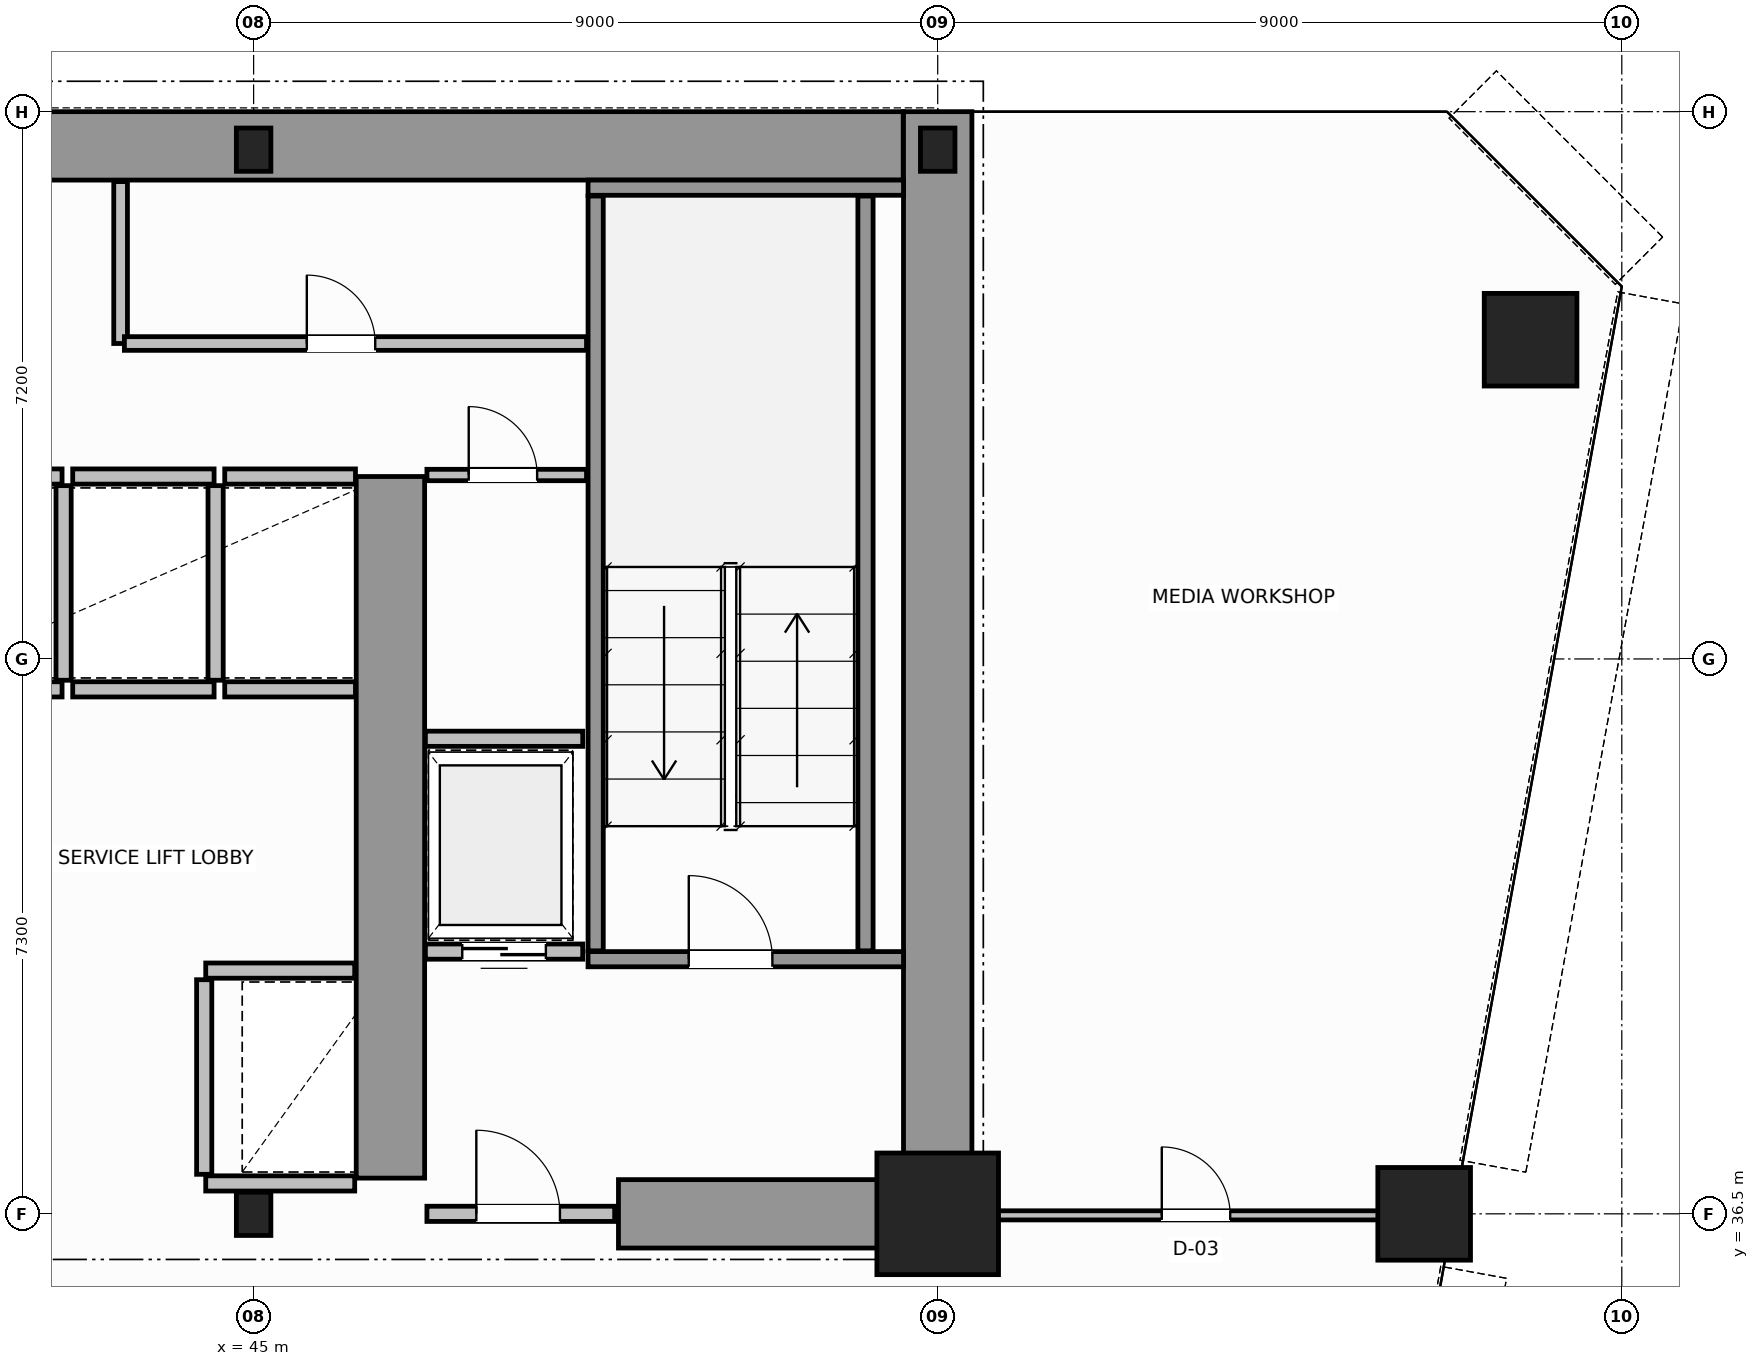
"""IFC4 building model, lengths in metres.
Left out: names, types, materials, properties, quantities, classifications, styles, units other than length and angle.
Written with IfcOpenShell. Run it as: python <this file> out.ifc"""

import sys

from ifc_helpers import new_model, si_unit, direction, frame, frame_2d, origin, origin_2d, place, context, subcontext, project, spatial, rectangle, hollow_circle, i_section, extrude, source, transform, mapped, element, fill, save


model = new_model("IFC4")
c1 = context("Model", 3, precision=1e-05, world=origin(), true_north=direction((0.0, 1.0)))
c2 = subcontext(c1, "Body", "Model", "MODEL_VIEW")
j1 = project(units=[si_unit("LENGTHUNIT", "METRE"), si_unit("PLANEANGLEUNIT", "RADIAN")], contexts=[c1])
p1 = place(None, origin())
s1 = spatial("IfcSite", under=j1, at=p1, CompositionType="ELEMENT")
p2 = place(p1, origin())
s2 = spatial("IfcBuilding", under=s1, at=p2, CompositionType="ELEMENT")
p3 = place(p2, frame((0.0, 0.0, 30.2)))
s3 = spatial("IfcBuildingStorey", under=s2, at=p3, CompositionType="ELEMENT", Elevation=30.2)
m1 = source(origin(), c2, "Body", "SweptSolid", [
    extrude(i_section(OverallWidth=0.454, OverallDepth=0.569, WebThickness=0.078, FlangeThickness=0.08, FilletRadius=0.015, at=origin_2d()), origin(), (0.0, 0.0, 1.0), 3.8),
])
p4 = place(p3, frame((45.0, 36.5, 0.0), z_axis=(0.0, 0.0, 1.0), x_axis=(1.0, 0.0, 0.0)))
e1 = element("IfcColumn", 1, at=p4, inside=s3, PredefinedType="COLUMN", context=c2, shape_type="MappedRepresentation", body=[
    mapped(m1, transform((0.0, 0.0, 0.0), scale=1.0)),
])
m2 = source(origin(), c2, "Body", "SweptSolid", [
    extrude(rectangle(XDim=1.6, YDim=1.6, at=origin_2d()), origin(), (0.0, 0.0, 1.0), 3.8),
])
p5 = place(p3, frame((54.0, 36.5, 0.0), z_axis=(0.0, 0.0, 1.0), x_axis=(1.0, 0.0, 0.0)))
e2 = element("IfcColumn", 2, at=p5, inside=s3, PredefinedType="COLUMN", context=c2, shape_type="MappedRepresentation", body=[
    mapped(m2, transform((0.0, 0.0, 0.0), scale=1.0)),
])
for number, where, z_axis, x_axis in (
    (3, (45.0, 50.5, 0.0), (0.0, 0.0, 1.0), (1.0, 0.0, 0.0)),
    (4, (54.0, 50.5, 0.0), (0.0, 0.0, 1.0), (1.0, 0.0, 0.0)),
):
    element("IfcColumn", number, at=place(p3, frame(where, z_axis=z_axis, x_axis=x_axis)), inside=s3, PredefinedType="COLUMN", context=c2, shape_type="MappedRepresentation", body=[
        mapped(m1, transform((0.0, 0.0, 0.0), scale=1.0)),
    ])
m3 = source(origin(), c2, "Body", "SweptSolid", [
    extrude(hollow_circle(Radius=0.61, WallThickness=0.05, at=origin_2d()), origin(), (0.0, 0.0, 1.0), 3.8),
])
for number, where, z_axis, x_axis in (
    (5, (61.8, 48.0, 0.0), (0.0, 0.0, 1.0), (1.0, 0.0, 0.0)),
    (6, (60.4, 36.5, 0.0), (0.0, 0.0, 1.0), (1.0, 0.0, 0.0)),
):
    element("IfcColumn", number, at=place(p3, frame(where, z_axis=z_axis, x_axis=x_axis)), inside=s3, PredefinedType="COLUMN", context=c2, shape_type="MappedRepresentation", body=[
        mapped(m3, transform((0.0, 0.0, 0.0), scale=1.0)),
    ])
p6 = place(p3, frame((34.002, 50.55, 0.0), z_axis=(0.0, 0.0, 1.0), x_axis=(1.0, 0.0, 0.0)))
e7 = element("IfcWall", 7, at=p6, inside=s3, PredefinedType="SHEAR", context=c2, shape_type="SweptSolid", body=[
    extrude(rectangle(XDim=19.544, YDim=0.9, at=frame_2d((9.772, 0.0))), origin(), (0.0, 0.0, 1.0), 3.8),
])
p7 = place(p3, frame((54.0, 36.5, 0.0), z_axis=(0.0, 0.0, 1.0), x_axis=(0.0, 1.0, 0.0)))
e8 = element("IfcWall", 8, at=p7, inside=s3, PredefinedType="SHEAR", context=c2, shape_type="SweptSolid", body=[
    extrude(rectangle(XDim=14.5, YDim=0.9, at=frame_2d((7.25, 0.0))), origin(), (0.0, 0.0, 1.0), 3.8),
])
p8 = place(p3, frame((49.8, 36.5, 0.0), z_axis=(0.0, 0.0, 1.0), x_axis=(1.0, 0.0, 0.0)))
e9 = element("IfcWall", 9, at=p8, inside=s3, PredefinedType="SHEAR", context=c2, shape_type="SweptSolid", body=[
    extrude(rectangle(XDim=3.73, YDim=0.9, at=frame_2d((1.865, 0.0))), origin(), (0.0, 0.0, 1.0), 2.38),
])
p9 = place(p3, frame((46.8, 36.97, 0.0), z_axis=(0.0, 0.0, 1.0), x_axis=(0.0, 1.0, 0.0)))
e10 = element("IfcWall", 10, at=p9, inside=s3, PredefinedType="SHEAR", context=c2, shape_type="SweptSolid", body=[
    extrude(rectangle(XDim=9.23, YDim=0.9, at=frame_2d((4.615, 0.0))), origin(), (0.0, 0.0, 1.0), 3.8),
])
p10 = place(p3, frame((49.4, 39.85, 0.0), z_axis=(0.0, 0.0, 1.0), x_axis=(1.0, 0.0, 0.0)))
e11 = element("IfcWall", 11, at=p10, inside=s3, PredefinedType="SOLIDWALL", context=c2, shape_type="SweptSolid", body=[
    extrude(rectangle(XDim=4.15, YDim=0.2, at=frame_2d((2.075, 0.0))), origin(), (0.0, 0.0, 1.0), 3.8),
])
p11 = place(p10, frame((1.325, 0.0, 0.0)))
e12 = element("IfcOpeningElement", 12, at=p11, cuts=e11, PredefinedType="OPENING", context=c2, shape_type="SweptSolid", body=[
    extrude(rectangle(XDim=1.1, YDim=2.15, at=frame_2d((0.55, 1.075))), frame((0.0, 0.11, 0.0), z_axis=(0.0, -1.0, 0.0), x_axis=(1.0, 0.0, 0.0)), (0.0, 0.0, 1.0), 0.22),
])
p12 = place(p3, frame((49.4, 50.0, 0.0), z_axis=(0.0, 0.0, 1.0), x_axis=(1.0, 0.0, 0.0)))
e13 = element("IfcWall", 13, at=p12, inside=s3, PredefinedType="SOLIDWALL", context=c2, shape_type="SweptSolid", body=[
    extrude(rectangle(XDim=4.15, YDim=0.2, at=frame_2d((2.075, 0.0))), origin(), (0.0, 0.0, 1.0), 3.8),
])
for number, where, z_axis, x_axis in (
    (14, (49.5, 39.96, 0.0), (0.0, 0.0, 1.0), (0.0, 1.0, 0.0)),
    (15, (53.05, 39.96, 0.0), (0.0, 0.0, 1.0), (0.0, 1.0, 0.0)),
):
    element("IfcWall", number, at=place(p3, frame(where, z_axis=z_axis, x_axis=x_axis)), inside=s3, PredefinedType="SOLIDWALL", context=c2, shape_type="SweptSolid", body=[
        extrude(rectangle(XDim=9.93, YDim=0.2, at=frame_2d((4.965, 0.0))), origin(), (0.0, 0.0, 1.0), 3.8),
    ])
p13 = place(p3, frame((47.28, 36.5, 0.0), z_axis=(0.0, 0.0, 1.0), x_axis=(1.0, 0.0, 0.0)))
e16 = element("IfcWall", 16, at=p13, inside=s3, PredefinedType="SOLIDWALL", context=c2, shape_type="SweptSolid", body=[
    extrude(rectangle(XDim=2.47, YDim=0.2, at=frame_2d((1.235, 0.0))), origin(), (0.0, 0.0, 1.0), 2.37),
])
p14 = place(p13, frame((0.65, 0.0, 0.0)))
e17 = element("IfcOpeningElement", 17, at=p14, cuts=e16, PredefinedType="OPENING", context=c2, shape_type="SweptSolid", body=[
    extrude(rectangle(XDim=1.1, YDim=2.15, at=frame_2d((0.55, 1.075))), frame((0.0, 0.11, 0.0), z_axis=(0.0, -1.0, 0.0), x_axis=(1.0, 0.0, 0.0)), (0.0, 0.0, 1.0), 0.22),
])
p15 = place(p3, frame((44.37, 39.7, 0.0), z_axis=(0.0, 0.0, 1.0), x_axis=(1.0, 0.0, 0.0)))
e18 = element("IfcWall", 18, at=p15, inside=s3, PredefinedType="SOLIDWALL", context=c2, shape_type="SweptSolid", body=[
    extrude(rectangle(XDim=1.96, YDim=0.2, at=frame_2d((0.98, 0.0))), origin(), (0.0, 0.0, 1.0), 3.58),
])
p16 = place(p3, frame((44.37, 36.9, 0.0), z_axis=(0.0, 0.0, 1.0), x_axis=(1.0, 0.0, 0.0)))
e19 = element("IfcWall", 19, at=p16, inside=s3, PredefinedType="SOLIDWALL", context=c2, shape_type="SweptSolid", body=[
    extrude(rectangle(XDim=1.96, YDim=0.2, at=frame_2d((0.98, 0.0))), origin(), (0.0, 0.0, 1.0), 2.37),
])
p17 = place(p3, frame((44.35, 37.02, 0.0), z_axis=(0.0, 0.0, 1.0), x_axis=(0.0, 1.0, 0.0)))
e20 = element("IfcWall", 20, at=p17, inside=s3, PredefinedType="SOLIDWALL", context=c2, shape_type="SweptSolid", body=[
    extrude(rectangle(XDim=2.56, YDim=0.2, at=frame_2d((1.28, 0.0))), origin(), (0.0, 0.0, 1.0), 3.58),
])
for number, where, z_axis, x_axis in (
    (21, (40.62, 43.4, 0.0), (0.0, 0.0, 1.0), (1.0, 0.0, 0.0)),
    (22, (40.62, 46.2, 0.0), (0.0, 0.0, 1.0), (1.0, 0.0, 0.0)),
):
    element("IfcWall", number, at=place(p3, frame(where, z_axis=z_axis, x_axis=x_axis)), inside=s3, PredefinedType="SOLIDWALL", context=c2, shape_type="SweptSolid", body=[
        extrude(rectangle(XDim=1.86, YDim=0.2, at=frame_2d((0.93, 0.0))), origin(), (0.0, 0.0, 1.0), 3.58),
    ])
p18 = place(p3, frame((42.5, 43.52, 0.0), z_axis=(0.0, 0.0, 1.0), x_axis=(0.0, 1.0, 0.0)))
e23 = element("IfcWall", 23, at=p18, inside=s3, PredefinedType="SOLIDWALL", context=c2, shape_type="SweptSolid", body=[
    extrude(rectangle(XDim=2.56, YDim=0.2, at=frame_2d((1.28, 0.0))), origin(), (0.0, 0.0, 1.0), 3.58),
])
for number, where, z_axis, x_axis in (
    (24, (42.62, 43.4, 0.0), (0.0, 0.0, 1.0), (1.0, 0.0, 0.0)),
    (25, (42.62, 46.2, 0.0), (0.0, 0.0, 1.0), (1.0, 0.0, 0.0)),
):
    element("IfcWall", number, at=place(p3, frame(where, z_axis=z_axis, x_axis=x_axis)), inside=s3, PredefinedType="SOLIDWALL", context=c2, shape_type="SweptSolid", body=[
        extrude(rectangle(XDim=1.86, YDim=0.2, at=frame_2d((0.93, 0.0))), origin(), (0.0, 0.0, 1.0), 3.58),
    ])
p19 = place(p3, frame((44.5, 43.52, 0.0), z_axis=(0.0, 0.0, 1.0), x_axis=(0.0, 1.0, 0.0)))
e26 = element("IfcWall", 26, at=p19, inside=s3, PredefinedType="SOLIDWALL", context=c2, shape_type="SweptSolid", body=[
    extrude(rectangle(XDim=2.56, YDim=0.2, at=frame_2d((1.28, 0.0))), origin(), (0.0, 0.0, 1.0), 3.58),
])
for number, where, z_axis, x_axis in (
    (27, (44.62, 43.4, 0.0), (0.0, 0.0, 1.0), (1.0, 0.0, 0.0)),
    (28, (44.62, 46.2, 0.0), (0.0, 0.0, 1.0), (1.0, 0.0, 0.0)),
):
    element("IfcWall", number, at=place(p3, frame(where, z_axis=z_axis, x_axis=x_axis)), inside=s3, PredefinedType="SOLIDWALL", context=c2, shape_type="SweptSolid", body=[
        extrude(rectangle(XDim=1.72, YDim=0.2, at=frame_2d((0.86, 0.0))), origin(), (0.0, 0.0, 1.0), 3.58),
    ])
p20 = place(p3, frame((47.26, 39.95, 0.0), z_axis=(0.0, 0.0, 1.0), x_axis=(1.0, 0.0, 0.0)))
e29 = element("IfcWall", 29, at=p20, inside=s3, PredefinedType="SOLIDWALL", context=c2, shape_type="SweptSolid", body=[
    extrude(rectangle(XDim=2.07, YDim=0.2, at=frame_2d((1.035, 0.0))), origin(), (0.0, 0.0, 1.0), 3.58),
])
p21 = place(p20, frame((0.485, 0.0, 0.0)))
e30 = element("IfcOpeningElement", 30, at=p21, cuts=e29, PredefinedType="OPENING", context=c2, shape_type="SweptSolid", body=[
    extrude(rectangle(XDim=1.1, YDim=2.15, at=frame_2d((0.55, 1.075))), frame((0.0, 0.11, 0.0), z_axis=(0.0, -1.0, 0.0), x_axis=(1.0, 0.0, 0.0)), (0.0, 0.0, 1.0), 0.22),
])
p22 = place(p3, frame((47.26, 42.75, 0.0), z_axis=(0.0, 0.0, 1.0), x_axis=(1.0, 0.0, 0.0)))
e31 = element("IfcWall", 31, at=p22, inside=s3, PredefinedType="SOLIDWALL", context=c2, shape_type="SweptSolid", body=[
    extrude(rectangle(XDim=2.07, YDim=0.2, at=frame_2d((1.035, 0.0))), origin(), (0.0, 0.0, 1.0), 3.58),
])
p23 = place(p3, frame((47.28, 46.22, 0.0), z_axis=(0.0, 0.0, 1.0), x_axis=(1.0, 0.0, 0.0)))
e32 = element("IfcWall", 32, at=p23, inside=s3, PredefinedType="PARTITIONING", context=c2, shape_type="SweptSolid", body=[
    extrude(rectangle(XDim=2.1, YDim=0.15, at=frame_2d((1.05, 0.0))), origin(), (0.0, 0.0, 1.0), 3.58),
])
p24 = place(p23, frame((0.55, 0.0, 0.0)))
e33 = element("IfcOpeningElement", 33, at=p24, cuts=e32, PredefinedType="OPENING", context=c2, shape_type="SweptSolid", body=[
    extrude(rectangle(XDim=0.9, YDim=2.1, at=frame_2d((0.45, 1.05))), frame((0.0, 0.085, 0.0), z_axis=(0.0, -1.0, 0.0), x_axis=(1.0, 0.0, 0.0)), (0.0, 0.0, 1.0), 0.17),
])
p25 = place(p3, frame((43.25, 47.95, 0.0), z_axis=(0.0, 0.0, 1.0), x_axis=(0.0, 1.0, 0.0)))
e34 = element("IfcWall", 34, at=p25, inside=s3, PredefinedType="PLUMBINGWALL", context=c2, shape_type="SweptSolid", body=[
    extrude(rectangle(XDim=2.13, YDim=0.18, at=frame_2d((1.065, 0.0))), origin(), (0.0, 0.0, 1.0), 3.58),
])
p26 = place(p3, frame((43.3, 47.95, 0.0), z_axis=(0.0, 0.0, 1.0), x_axis=(1.0, 0.0, 0.0)))
e35 = element("IfcWall", 35, at=p26, inside=s3, PredefinedType="PLUMBINGWALL", context=c2, shape_type="SweptSolid", body=[
    extrude(rectangle(XDim=6.08, YDim=0.18, at=frame_2d((3.04, 0.0))), origin(), (0.0, 0.0, 1.0), 3.58),
])
p27 = place(p26, frame((2.4, 0.0, 0.0)))
e36 = element("IfcOpeningElement", 36, at=p27, cuts=e35, PredefinedType="OPENING", context=c2, shape_type="SweptSolid", body=[
    extrude(rectangle(XDim=0.9, YDim=2.15, at=frame_2d((0.45, 1.075))), frame((0.0, 0.1, 0.0), z_axis=(0.0, -1.0, 0.0), x_axis=(1.0, 0.0, 0.0)), (0.0, 0.0, 1.0), 0.2),
])
p28 = place(p3, frame((54.06, 36.48, 0.0), z_axis=(0.0, 0.0, 1.0), x_axis=(1.0, 0.0, 0.0)))
e37 = element("IfcWall", 37, at=p28, inside=s3, PredefinedType="PARTITIONING", context=c2, shape_type="SweptSolid", body=[
    extrude(rectangle(XDim=6.675, YDim=0.12, at=frame_2d((3.337, 0.0))), origin(), (0.0, 0.0, 1.0), 2.77),
])
p29 = place(p28, frame((2.888, 0.0, 0.0)))
e38 = element("IfcOpeningElement", 38, at=p29, cuts=e37, PredefinedType="OPENING", context=c2, shape_type="SweptSolid", body=[
    extrude(rectangle(XDim=0.9, YDim=2.15, at=frame_2d((0.45, 1.075))), frame((0.0, 0.07, 0.0), z_axis=(0.0, -1.0, 0.0), x_axis=(1.0, 0.0, 0.0)), (0.0, 0.0, 1.0), 0.14),
])
m4 = source(origin(), c2, "Body", "SweptSolid", [
    extrude(rectangle(XDim=1.1, YDim=2.15, at=frame_2d((0.55, 1.075))), frame((0.0, 0.025, 0.0), z_axis=(0.0, -1.0, 0.0), x_axis=(1.0, 0.0, 0.0)), (0.0, 0.0, 1.0), 0.05),
])
p30 = place(p11, origin())
e39 = element("IfcDoor", 39, at=p30, inside=s3, OperationType="SINGLE_SWING_RIGHT", PredefinedType="DOOR", context=c2, shape_type="MappedRepresentation", body=[
    mapped(m4, transform((0.0, 0.0, 0.0), scale=1.0)),
])
fill(e12, e39)
p31 = place(p14, origin())
e40 = element("IfcDoor", 40, at=p31, inside=s3, OperationType="SINGLE_SWING_LEFT", PredefinedType="DOOR", context=c2, shape_type="MappedRepresentation", body=[
    mapped(m4, transform((0.0, 0.0, 0.0), scale=1.0)),
])
fill(e17, e40)
p32 = place(p21, origin())
e41 = element("IfcDoor", 41, at=p32, inside=s3, OperationType="DOUBLE_DOOR_SLIDING", PredefinedType="DOOR", context=c2, shape_type="MappedRepresentation", body=[
    mapped(m4, transform((0.0, 0.0, 0.0), scale=1.0)),
])
fill(e30, e41)
m5 = source(origin(), c2, "Body", "SweptSolid", [
    extrude(rectangle(XDim=0.9, YDim=2.1, at=frame_2d((0.45, 1.05))), frame((0.0, 0.025, 0.0), z_axis=(0.0, -1.0, 0.0), x_axis=(1.0, 0.0, 0.0)), (0.0, 0.0, 1.0), 0.05),
])
p33 = place(p24, origin())
e42 = element("IfcDoor", 42, at=p33, inside=s3, OperationType="SINGLE_SWING_RIGHT", PredefinedType="DOOR", context=c2, shape_type="MappedRepresentation", body=[
    mapped(m5, transform((0.0, 0.0, 0.0), scale=1.0)),
])
fill(e33, e42)
m6 = source(origin(), c2, "Body", "SweptSolid", [
    extrude(rectangle(XDim=0.9, YDim=2.15, at=frame_2d((0.45, 1.075))), frame((0.0, 0.025, 0.0), z_axis=(0.0, -1.0, 0.0), x_axis=(1.0, 0.0, 0.0)), (0.0, 0.0, 1.0), 0.05),
])
p34 = place(p27, origin())
e43 = element("IfcDoor", 43, at=p34, inside=s3, OperationType="SINGLE_SWING_RIGHT", PredefinedType="DOOR", context=c2, shape_type="MappedRepresentation", body=[
    mapped(m6, transform((0.0, 0.0, 0.0), scale=1.0)),
])
fill(e36, e43)
p35 = place(p29, origin())
e44 = element("IfcDoor", 44, at=p35, inside=s3, OperationType="SINGLE_SWING_RIGHT", PredefinedType="DOOR", context=c2, shape_type="MappedRepresentation", body=[
    mapped(m6, transform((0.0, 0.0, 0.0), scale=1.0)),
])
fill(e38, e44)
save(model, sys.argv[1])
